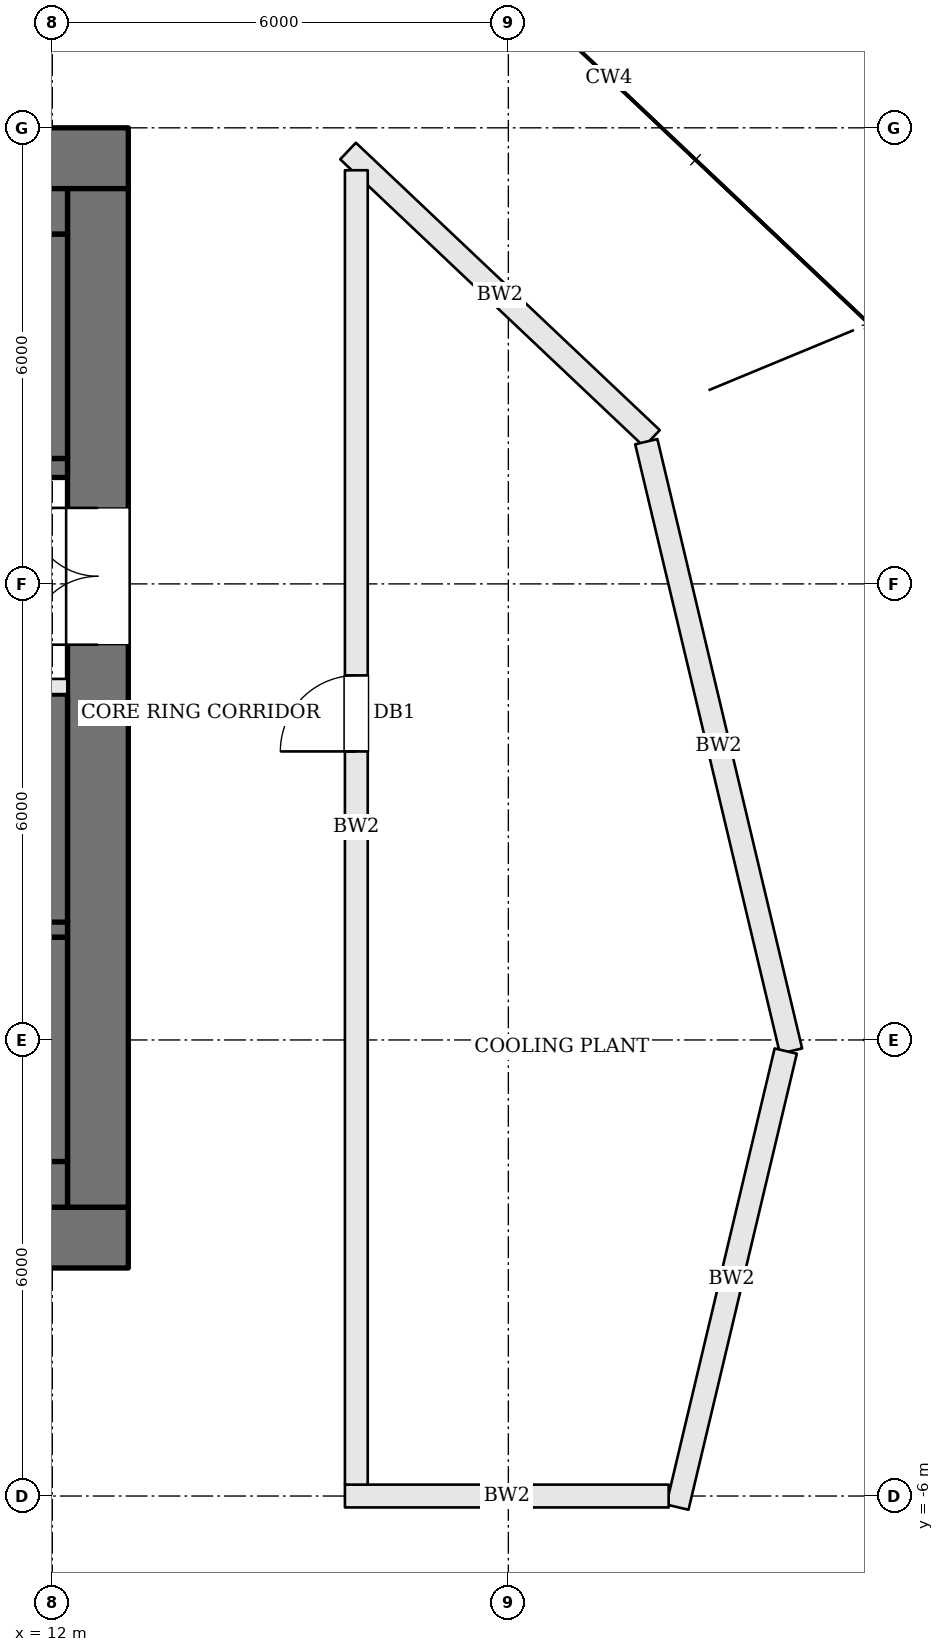
"""IFC4 building model, lengths in metres.
Left out: names, types, materials, properties, quantities, classifications, styles, units other than length and angle.
Written with IfcOpenShell. Run it as: python <this file> out.ifc"""

import sys

from ifc_helpers import new_model, si_unit, direction, frame, frame_2d, origin, place, context, subcontext, project, spatial, rectangle, extrude, element, fill, save


model = new_model("IFC4")
c1 = context("Model", 3, precision=1e-05, world=origin(), true_north=direction((0.0, 1.0)))
c2 = subcontext(c1, "Body", "Model", "MODEL_VIEW")
j1 = project(units=[si_unit("LENGTHUNIT", "METRE"), si_unit("PLANEANGLEUNIT", "RADIAN")], contexts=[c1])
p1 = place(None, origin())
s1 = spatial("IfcSite", under=j1, at=p1, CompositionType="ELEMENT")
p2 = place(p1, origin())
s2 = spatial("IfcBuilding", under=s1, at=p2, CompositionType="ELEMENT")
p3 = place(p2, frame((0.0, 0.0, 312.0)))
s3 = spatial("IfcBuildingStorey", under=s2, at=p3, CompositionType="ELEMENT", Elevation=312.0)
p4 = place(p3, frame((-13.0, 11.6, 0.0), z_axis=(0.0, 0.0, 1.0), x_axis=(1.0, 0.0, 0.0)))
e1 = element("IfcWall", 1, at=p4, inside=s3, PredefinedType="SHEAR", context=c2, shape_type="SweptSolid", body=[
    extrude(rectangle(XDim=26.0, YDim=0.8, at=frame_2d((13.0, 0.0))), origin(), (0.0, 0.0, 1.0), 4.2),
])
p5 = place(p4, frame((8.975, 0.0, 0.0)))
e2 = element("IfcOpeningElement", 2, at=p5, cuts=e1, PredefinedType="OPENING", context=c2, shape_type="SweptSolid", body=[
    extrude(rectangle(XDim=0.7, YDim=2.1, at=frame_2d((0.35, 1.05))), frame((0.0, 0.41, 0.0), z_axis=(0.0, -1.0, 0.0), x_axis=(1.0, 0.0, 0.0)), (0.0, 0.0, 1.0), 0.82),
])
p6 = place(p4, frame((11.575, 0.0, 0.0)))
e3 = element("IfcOpeningElement", 3, at=p6, cuts=e1, PredefinedType="OPENING", context=c2, shape_type="SweptSolid", body=[
    extrude(rectangle(XDim=1.2, YDim=2.1, at=frame_2d((0.6, 1.05))), frame((0.0, 0.41, 0.0), z_axis=(0.0, -1.0, 0.0), x_axis=(1.0, 0.0, 0.0)), (0.0, 0.0, 1.0), 0.82),
])
p7 = place(p4, frame((14.675, 0.0, 0.0)))
e4 = element("IfcOpeningElement", 4, at=p7, cuts=e1, PredefinedType="OPENING", context=c2, shape_type="SweptSolid", body=[
    extrude(rectangle(XDim=0.7, YDim=2.1, at=frame_2d((0.35, 1.05))), frame((0.0, 0.41, 0.0), z_axis=(0.0, -1.0, 0.0), x_axis=(1.0, 0.0, 0.0)), (0.0, 0.0, 1.0), 0.82),
])
p8 = place(p4, frame((16.725, 0.0, 0.0)))
e5 = element("IfcOpeningElement", 5, at=p8, cuts=e1, PredefinedType="OPENING", context=c2, shape_type="SweptSolid", body=[
    extrude(rectangle(XDim=0.7, YDim=2.1, at=frame_2d((0.35, 1.05))), frame((0.0, 0.41, 0.0), z_axis=(0.0, -1.0, 0.0), x_axis=(1.0, 0.0, 0.0)), (0.0, 0.0, 1.0), 0.82),
])
p9 = place(p3, frame((-13.0, -2.6, 0.0), z_axis=(0.0, 0.0, 1.0), x_axis=(1.0, 0.0, 0.0)))
e6 = element("IfcWall", 6, at=p9, inside=s3, PredefinedType="SHEAR", context=c2, shape_type="SweptSolid", body=[
    extrude(rectangle(XDim=26.0, YDim=0.8, at=frame_2d((13.0, 0.0))), origin(), (0.0, 0.0, 1.0), 4.2),
])
p10 = place(p9, frame((8.975, 0.0, 0.0)))
e7 = element("IfcOpeningElement", 7, at=p10, cuts=e6, PredefinedType="OPENING", context=c2, shape_type="SweptSolid", body=[
    extrude(rectangle(XDim=0.7, YDim=2.1, at=frame_2d((0.35, 1.05))), frame((0.0, 0.41, 0.0), z_axis=(0.0, -1.0, 0.0), x_axis=(1.0, 0.0, 0.0)), (0.0, 0.0, 1.0), 0.82),
])
p11 = place(p9, frame((12.0, 0.0, 0.0)))
e8 = element("IfcOpeningElement", 8, at=p11, cuts=e6, PredefinedType="OPENING", context=c2, shape_type="SweptSolid", body=[
    extrude(rectangle(XDim=1.2, YDim=2.1, at=frame_2d((0.6, 1.05))), frame((0.0, 0.41, 0.0), z_axis=(0.0, -1.0, 0.0), x_axis=(1.0, 0.0, 0.0)), (0.0, 0.0, 1.0), 0.82),
])
p12 = place(p9, frame((15.675, 0.0, 0.0)))
e9 = element("IfcOpeningElement", 9, at=p12, cuts=e6, PredefinedType="OPENING", context=c2, shape_type="SweptSolid", body=[
    extrude(rectangle(XDim=1.2, YDim=2.1, at=frame_2d((0.6, 1.05))), frame((0.0, 0.41, 0.0), z_axis=(0.0, -1.0, 0.0), x_axis=(1.0, 0.0, 0.0)), (0.0, 0.0, 1.0), 0.82),
])
p13 = place(p3, frame((12.6, -2.2, 0.0), z_axis=(0.0, 0.0, 1.0), x_axis=(0.0, 1.0, 0.0)))
e10 = element("IfcWall", 10, at=p13, inside=s3, PredefinedType="SHEAR", context=c2, shape_type="SweptSolid", body=[
    extrude(rectangle(XDim=13.4, YDim=0.8, at=frame_2d((6.7, 0.0))), origin(), (0.0, 0.0, 1.0), 4.2),
])
p14 = place(p13, frame((7.4, 0.0, 0.0)))
e11 = element("IfcOpeningElement", 11, at=p14, cuts=e10, PredefinedType="OPENING", context=c2, shape_type="SweptSolid", body=[
    extrude(rectangle(XDim=1.8, YDim=2.1, at=frame_2d((0.9, 1.05))), frame((0.0, 0.41, 0.0), z_axis=(0.0, -1.0, 0.0), x_axis=(1.0, 0.0, 0.0)), (0.0, 0.0, 1.0), 0.82),
])
p15 = place(p3, frame((12.2, 7.525, 0.0), z_axis=(0.0, 0.0, 1.0), x_axis=(-1.0, 0.0, 0.0)))
e12 = element("IfcWall", 12, at=p15, inside=s3, PredefinedType="SOLIDWALL", context=c2, shape_type="SweptSolid", body=[
    extrude(rectangle(XDim=7.1, YDim=0.25, at=frame_2d((3.55, 0.0))), origin(), (0.0, 0.0, 1.0), 4.0),
])
p16 = place(p15, frame((5.8, 0.0, 0.0)))
e13 = element("IfcOpeningElement", 13, at=p16, cuts=e12, PredefinedType="OPENING", context=c2, shape_type="SweptSolid", body=[
    extrude(rectangle(XDim=1.2, YDim=2.1, at=frame_2d((0.6, 1.05))), frame((0.0, 0.135, 0.0), z_axis=(0.0, -1.0, 0.0), x_axis=(1.0, 0.0, 0.0)), (0.0, 0.0, 1.0), 0.27),
])
p17 = place(p3, frame((12.2, 4.65, 0.0), z_axis=(0.0, 0.0, 1.0), x_axis=(-1.0, 0.0, 0.0)))
e14 = element("IfcWall", 14, at=p17, inside=s3, PredefinedType="SOLIDWALL", context=c2, shape_type="SweptSolid", body=[
    extrude(rectangle(XDim=7.1, YDim=0.2, at=frame_2d((3.55, 0.0))), origin(), (0.0, 0.0, 1.0), 4.0),
])
p18 = place(p17, frame((4.4, 0.0, 0.0)))
e15 = element("IfcOpeningElement", 15, at=p18, cuts=e14, PredefinedType="OPENING", context=c2, shape_type="SweptSolid", body=[
    extrude(rectangle(XDim=1.2, YDim=2.1, at=frame_2d((0.6, 1.05))), frame((0.0, 0.11, 0.0), z_axis=(0.0, -1.0, 0.0), x_axis=(1.0, 0.0, 0.0)), (0.0, 0.0, 1.0), 0.22),
])
p19 = place(p17, frame((1.1, 0.0, 0.0)))
e16 = element("IfcOpeningElement", 16, at=p19, cuts=e14, PredefinedType="OPENING", context=c2, shape_type="SweptSolid", body=[
    extrude(rectangle(XDim=1.2, YDim=2.1, at=frame_2d((0.6, 1.05))), frame((0.0, 0.11, 0.0), z_axis=(0.0, -1.0, 0.0), x_axis=(1.0, 0.0, 0.0)), (0.0, 0.0, 1.0), 0.22),
])
p20 = place(p3, frame((12.2, 1.475, 0.0), z_axis=(0.0, 0.0, 1.0), x_axis=(-1.0, 0.0, 0.0)))
e17 = element("IfcWall", 17, at=p20, inside=s3, PredefinedType="SOLIDWALL", context=c2, shape_type="SweptSolid", body=[
    extrude(rectangle(XDim=7.1, YDim=0.25, at=frame_2d((3.55, 0.0))), origin(), (0.0, 0.0, 1.0), 4.0),
])
p21 = place(p20, frame((5.8, 0.0, 0.0)))
e18 = element("IfcOpeningElement", 18, at=p21, cuts=e17, PredefinedType="OPENING", context=c2, shape_type="SweptSolid", body=[
    extrude(rectangle(XDim=1.2, YDim=2.1, at=frame_2d((0.6, 1.05))), frame((0.0, 0.135, 0.0), z_axis=(0.0, -1.0, 0.0), x_axis=(1.0, 0.0, 0.0)), (0.0, 0.0, 1.0), 0.27),
])
p22 = place(p3, frame((12.2, 10.9, 0.0), z_axis=(0.0, 0.0, 1.0), x_axis=(-1.0, 0.0, 0.0)))
e19 = element("IfcWall", 19, at=p22, inside=s3, PredefinedType="SOLIDWALL", context=c2, shape_type="SweptSolid", body=[
    extrude(rectangle(XDim=7.1, YDim=0.6, at=frame_2d((3.55, 0.0))), origin(), (0.0, 0.0, 1.0), 4.0),
])
p23 = place(p3, frame((11.9, 10.6, 0.0), z_axis=(0.0, 0.0, 1.0), x_axis=(0.0, -1.0, 0.0)))
e20 = element("IfcWall", 20, at=p23, inside=s3, PredefinedType="SOLIDWALL", context=c2, shape_type="SweptSolid", body=[
    extrude(rectangle(XDim=2.95, YDim=0.6, at=frame_2d((1.475, 0.0))), origin(), (0.0, 0.0, 1.0), 4.0),
])
p24 = place(p3, frame((11.9, 4.55, 0.0), z_axis=(0.0, 0.0, 1.0), x_axis=(0.0, -1.0, 0.0)))
e21 = element("IfcWall", 21, at=p24, inside=s3, PredefinedType="SOLIDWALL", context=c2, shape_type="SweptSolid", body=[
    extrude(rectangle(XDim=3.0, YDim=0.6, at=frame_2d((1.5, 0.0))), origin(), (0.0, 0.0, 1.0), 4.0),
])
p25 = place(p3, frame((11.9, 1.35, 0.0), z_axis=(0.0, 0.0, 1.0), x_axis=(0.0, -1.0, 0.0)))
e22 = element("IfcWall", 22, at=p25, inside=s3, PredefinedType="SOLIDWALL", context=c2, shape_type="SweptSolid", body=[
    extrude(rectangle(XDim=2.95, YDim=0.6, at=frame_2d((1.475, 0.0))), origin(), (0.0, 0.0, 1.0), 4.0),
])
p26 = place(p3, frame((12.2, -1.9, 0.0), z_axis=(0.0, 0.0, 1.0), x_axis=(-1.0, 0.0, 0.0)))
e23 = element("IfcWall", 23, at=p26, inside=s3, PredefinedType="SOLIDWALL", context=c2, shape_type="SweptSolid", body=[
    extrude(rectangle(XDim=7.1, YDim=0.6, at=frame_2d((3.55, 0.0))), origin(), (0.0, 0.0, 1.0), 4.0),
])
p27 = place(p3, frame((15.891, 11.695, 0.0), z_axis=(0.0, 0.0, 1.0), x_axis=(0.726531870531, -0.687132768178, 0.0)))
e24 = element("IfcWall", 24, at=p27, inside=s3, PredefinedType="SOLIDWALL", context=c2, shape_type="SweptSolid", body=[
    extrude(rectangle(XDim=5.503, YDim=0.3, at=frame_2d((2.751, 0.0))), origin(), (0.0, 0.0, 1.0), 3.534),
])
p28 = place(p3, frame((19.815, 7.871, 0.0), z_axis=(0.0, 0.0, 1.0), x_axis=(0.231071729636, -0.972936717245, 0.0)))
e25 = element("IfcWall", 25, at=p28, inside=s3, PredefinedType="SOLIDWALL", context=c2, shape_type="SweptSolid", body=[
    extrude(rectangle(XDim=8.24, YDim=0.3, at=frame_2d((4.12, 0.0))), origin(), (0.0, 0.0, 1.0), 3.534),
])
p29 = place(p3, frame((21.649, -0.146, 0.0), z_axis=(0.0, 0.0, 1.0), x_axis=(-0.231042450417, -0.972943670572, 0.0)))
e26 = element("IfcWall", 26, at=p29, inside=s3, PredefinedType="SOLIDWALL", context=c2, shape_type="SweptSolid", body=[
    extrude(rectangle(XDim=6.167, YDim=0.3, at=frame_2d((3.083, 0.0))), origin(), (0.0, 0.0, 1.0), 3.534),
])
p30 = place(p3, frame((20.109, -6.0, 0.0), z_axis=(0.0, 0.0, 1.0), x_axis=(-1.0, 0.0, 0.0)))
e27 = element("IfcWall", 27, at=p30, inside=s3, PredefinedType="SOLIDWALL", context=c2, shape_type="SweptSolid", body=[
    extrude(rectangle(XDim=4.259, YDim=0.3, at=frame_2d((2.129, 0.0))), origin(), (0.0, 0.0, 1.0), 3.534),
])
p31 = place(p3, frame((16.0, -5.85, 0.0), z_axis=(0.0, 0.0, 1.0), x_axis=(0.0, 1.0, 0.0)))
e28 = element("IfcWall", 28, at=p31, inside=s3, PredefinedType="SOLIDWALL", context=c2, shape_type="SweptSolid", body=[
    extrude(rectangle(XDim=17.292, YDim=0.3, at=frame_2d((8.646, 0.0))), origin(), (0.0, 0.0, 1.0), 3.534),
])
p32 = place(p31, frame((9.646, 0.0, 0.0)))
e29 = element("IfcOpeningElement", 29, at=p32, cuts=e28, PredefinedType="OPENING", context=c2, shape_type="SweptSolid", body=[
    extrude(rectangle(XDim=1.0, YDim=2.1, at=frame_2d((0.5, 1.05))), frame((0.0, 0.16, 0.0), z_axis=(0.0, -1.0, 0.0), x_axis=(1.0, 0.0, 0.0)), (0.0, 0.0, 1.0), 0.32),
])
p33 = place(p14, origin())
e30 = element("IfcDoor", 30, at=p33, inside=s3, OperationType="DOUBLE_DOOR_SINGLE_SWING", PredefinedType="DOOR", context=c2, shape_type="SweptSolid", body=[
    extrude(rectangle(XDim=1.8, YDim=2.1, at=frame_2d((0.9, 1.05))), frame((0.0, 0.025, 0.0), z_axis=(0.0, -1.0, 0.0), x_axis=(1.0, 0.0, 0.0)), (0.0, 0.0, 1.0), 0.05),
])
fill(e11, e30)
p34 = place(p32, origin())
e31 = element("IfcDoor", 31, at=p34, inside=s3, OperationType="SINGLE_SWING_LEFT", PredefinedType="DOOR", context=c2, shape_type="SweptSolid", body=[
    extrude(rectangle(XDim=1.0, YDim=2.1, at=frame_2d((0.5, 1.05))), frame((0.0, 0.025, 0.0), z_axis=(0.0, -1.0, 0.0), x_axis=(1.0, 0.0, 0.0)), (0.0, 0.0, 1.0), 0.05),
])
fill(e29, e31)
save(model, sys.argv[1])
